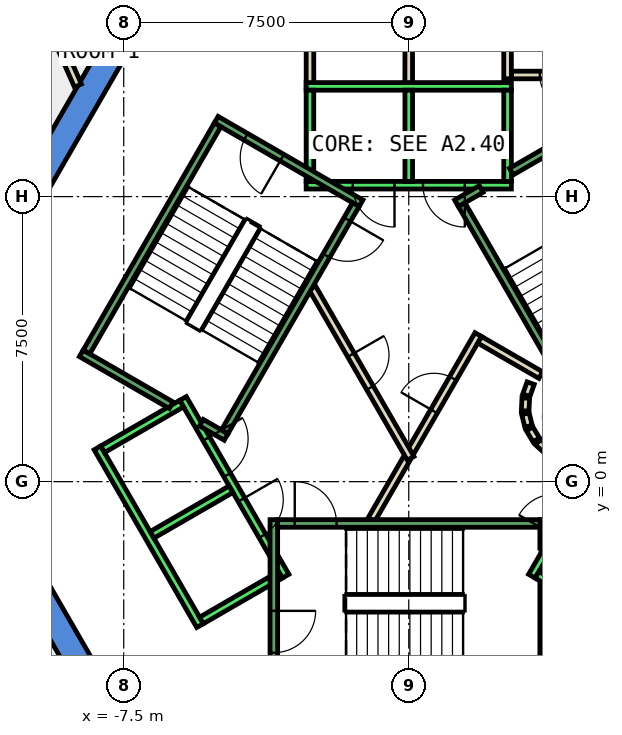
"""IFC4 building model, lengths in metres.
Left out: names, types, materials, properties, quantities, classifications, styles, units other than length and angle.
Written with IfcOpenShell. Run it as: python <this file> out.ifc"""

import sys

from ifc_helpers import new_model, si_unit, direction, frame, frame_2d, origin, place, context, subcontext, project, spatial, polyline, rectangle, outline, extrude, element, fill, save


model = new_model("IFC4")
c1 = context("Model", 3, precision=1e-05, world=origin(), true_north=direction((0.0, 1.0)))
c2 = subcontext(c1, "Body", "Model", "MODEL_VIEW")
j1 = project(units=[si_unit("LENGTHUNIT", "METRE"), si_unit("PLANEANGLEUNIT", "RADIAN")], contexts=[c1])
p1 = place(None, origin())
s1 = spatial("IfcSite", under=j1, at=p1, CompositionType="ELEMENT")
p2 = place(p1, origin())
s2 = spatial("IfcBuilding", under=s1, at=p2, CompositionType="ELEMENT")
p3 = place(p2, frame((0.0, 0.0, 198.2)))
s3 = spatial("IfcBuildingStorey", under=s2, at=p3, CompositionType="ELEMENT", Elevation=198.2)
p4 = place(p3, frame((0.0, 0.0, -0.4)))
e1 = element("IfcWall", 1, at=p4, inside=s3, PredefinedType="SHEAR", context=c2, shape_type="SweptSolid", body=[
    extrude(outline(polyline([(-11.834, 5.002), (-11.228, 4.652), (-6.235, 13.3), (-6.64, 14.0), (-11.834, 5.002)])), origin(), (0.0, 0.0, 1.0), 4.2),
])
p5 = place(p3, frame((0.0, 0.0, -0.4)))
e2 = element("IfcWall", 2, at=p5, inside=s3, PredefinedType="SHEAR", context=c2, shape_type="SweptSolid", body=[
    extrude(outline(polyline([(-13.279, 2.5), (-6.64, -9.0), (-6.235, -8.3), (-12.471, 2.5), (-13.279, 2.5)])), origin(), (0.0, 0.0, 1.0), 4.2),
])
p6 = place(p3, frame((-9.315, 11.801, 0.0), z_axis=(0.0, 0.0, 1.0), x_axis=(0.403943240321, -0.914784050254, 0.0)))
e3 = element("IfcWall", 3, at=p6, inside=s3, PredefinedType="PARTITIONING", context=c2, shape_type="SweptSolid", body=[
    extrude(rectangle(XDim=1.507, YDim=0.2, at=frame_2d((0.754, 0.0))), origin(), (0.0, 0.0, 1.0), 3.8),
])
p7 = place(p3, frame((5.1, 10.7, 0.0), z_axis=(0.0, 0.0, 1.0), x_axis=(-1.0, 0.0, 0.0)))
e4 = element("IfcWall", 4, at=p7, inside=s3, PredefinedType="PARTITIONING", context=c2, shape_type="SweptSolid", body=[
    extrude(rectangle(XDim=2.4, YDim=0.2, at=frame_2d((1.2, 0.0))), origin(), (0.0, 0.0, 1.0), 3.8),
])
p8 = place(p7, frame((0.75, 0.0, 0.0)))
e5 = element("IfcOpeningElement", 5, at=p8, cuts=e4, PredefinedType="OPENING", context=c2, shape_type="SweptSolid", body=[
    extrude(rectangle(XDim=0.9, YDim=2.1, at=frame_2d((0.45, 1.05))), frame((0.0, 0.11, 0.0), z_axis=(0.0, -1.0, 0.0), x_axis=(1.0, 0.0, 0.0)), (0.0, 0.0, 1.0), 0.22),
])
p9 = place(p3, frame((2.6, 10.6, 0.0), z_axis=(0.0, 0.0, 1.0), x_axis=(0.0, 1.0, 0.0)))
e6 = element("IfcWall", 6, at=p9, inside=s3, PredefinedType="PARTITIONING", context=c2, shape_type="SweptSolid", body=[
    extrude(rectangle(XDim=2.7, YDim=0.2, at=frame_2d((1.35, 0.0))), origin(), (0.0, 0.0, 1.0), 3.8),
])
p10 = place(p3, frame((-2.599, 10.399, 0.0), z_axis=(0.0, 0.0, 1.0), x_axis=(-0.000336615314, 0.999999943345, 0.0)))
e7 = element("IfcWall", 7, at=p10, inside=s3, PredefinedType="PARTITIONING", context=c2, shape_type="SweptSolid", body=[
    extrude(rectangle(XDim=2.901, YDim=0.2, at=frame_2d((1.451, 0.0))), origin(), (0.0, 0.0, 1.0), 3.8),
])
p11 = place(p3, frame((0.0, 13.3, 0.0), z_axis=(0.0, 0.0, 1.0), x_axis=(-0.000336728662, -0.999999943307, 0.0)))
e8 = element("IfcWall", 8, at=p11, inside=s3, PredefinedType="PARTITIONING", context=c2, shape_type="SweptSolid", body=[
    extrude(rectangle(XDim=2.9, YDim=0.2, at=frame_2d((1.45, 0.0))), origin(), (0.0, 0.0, 1.0), 3.8),
])
p12 = place(p11, frame((0.85, 0.0, 0.0)))
e9 = element("IfcOpeningElement", 9, at=p12, cuts=e8, PredefinedType="OPENING", context=c2, shape_type="SweptSolid", body=[
    extrude(rectangle(XDim=0.9, YDim=2.1, at=frame_2d((0.45, 1.05))), frame((0.0, 0.11, 0.0), z_axis=(0.0, -1.0, 0.0), x_axis=(1.0, 0.0, 0.0)), (0.0, 0.0, 1.0), 0.22),
])
p13 = place(p3, frame((-0.982, -1.0, 0.0), z_axis=(0.0, 0.0, 1.0), x_axis=(0.50024047865, 0.865886518847, 0.0)))
e10 = element("IfcWall", 10, at=p13, inside=s3, PredefinedType="PARTITIONING", context=c2, shape_type="SweptSolid", body=[
    extrude(rectangle(XDim=1.863, YDim=0.2, at=frame_2d((0.931, 0.0))), origin(), (0.0, 0.0, 1.0), 3.8),
])
p14 = place(p3, frame((0.05, 0.787, 0.0), z_axis=(0.0, 0.0, 1.0), x_axis=(0.499954076797, 0.866051915934, 0.0)))
e11 = element("IfcWall", 11, at=p14, inside=s3, PredefinedType="PARTITIONING", context=c2, shape_type="SweptSolid", body=[
    extrude(rectangle(XDim=3.558, YDim=0.2, at=frame_2d((1.779, 0.0))), origin(), (0.0, 0.0, 1.0), 3.8),
])
p15 = place(p14, frame((1.229, 0.0, 0.0)))
e12 = element("IfcOpeningElement", 12, at=p15, cuts=e11, PredefinedType="OPENING", context=c2, shape_type="SweptSolid", body=[
    extrude(rectangle(XDim=1.0, YDim=2.1, at=frame_2d((0.5, 1.05))), frame((0.0, 0.11, 0.0), z_axis=(0.0, -1.0, 0.0), x_axis=(1.0, 0.0, 0.0)), (0.0, 0.0, 1.0), 0.22),
])
p16 = place(p3, frame((1.866, 3.732, 0.0), z_axis=(0.0, 0.0, 1.0), x_axis=(0.866043361281, -0.499968895414, 0.0)))
e13 = element("IfcWall", 13, at=p16, inside=s3, PredefinedType="PARTITIONING", context=c2, shape_type="SweptSolid", body=[
    extrude(rectangle(XDim=1.858, YDim=0.2, at=frame_2d((0.929, 0.0))), origin(), (0.0, 0.0, 1.0), 3.8),
])
p17 = place(p3, frame((3.208, 2.592, 0.0), z_axis=(0.0, 0.0, 1.0), x_axis=(-0.337388820924, -0.941365382578, 0.0)))
e14 = element("IfcWall", 14, at=p17, inside=s3, PredefinedType="PARTITIONING", context=c2, shape_type="SweptSolid", body=[
    extrude(rectangle(XDim=0.338, YDim=0.2, at=frame_2d((0.169, 0.0))), origin(), (0.0, 0.0, 1.0), 3.8),
])
p18 = place(p3, frame((3.079, 2.199, 0.0), z_axis=(0.0, 0.0, 1.0), x_axis=(-0.047771483479, -0.998858290933, 0.0)))
e15 = element("IfcWall", 15, at=p18, inside=s3, PredefinedType="PARTITIONING", context=c2, shape_type="SweptSolid", body=[
    extrude(rectangle(XDim=0.337, YDim=0.2, at=frame_2d((0.169, 0.0))), origin(), (0.0, 0.0, 1.0), 3.8),
])
p19 = place(p3, frame((3.07, 1.786, 0.0), z_axis=(0.0, 0.0, 1.0), x_axis=(0.242705583207, -0.970099994784, 0.0)))
e16 = element("IfcWall", 16, at=p19, inside=s3, PredefinedType="PARTITIONING", context=c2, shape_type="SweptSolid", body=[
    extrude(rectangle(XDim=0.338, YDim=0.2, at=frame_2d((0.169, 0.0))), origin(), (0.0, 0.0, 1.0), 3.8),
])
for number, where, z_axis, x_axis in (
    (17, (3.182, 1.388, 0.0), (0.0, 0.0, 1.0), (0.512, -0.859, 0.0)),
    (18, (3.404, 1.039, 0.0), (0.0, 0.0, 1.0), (0.74, -0.672, 0.0)),
):
    element("IfcWall", number, at=place(p3, frame(where, z_axis=z_axis, x_axis=x_axis)), inside=s3, PredefinedType="PARTITIONING", context=c2, shape_type="SweptSolid", body=[
        extrude(rectangle(XDim=0.338, YDim=0.2, at=frame_2d((0.169, 0.0))), origin(), (0.0, 0.0, 1.0), 3.8),
    ])
p20 = place(p3, frame((-2.54, 5.1, 0.0), z_axis=(0.0, 0.0, 1.0), x_axis=(0.499925051871, -0.866068670783, 0.0)))
e19 = element("IfcWall", 19, at=p20, inside=s3, PredefinedType="PARTITIONING", context=c2, shape_type="SweptSolid", body=[
    extrude(rectangle(XDim=5.181, YDim=0.2, at=frame_2d((2.59, 0.0))), origin(), (0.0, 0.0, 1.0), 3.8),
])
p21 = place(p20, frame((2.04, 0.0, 0.0)))
e20 = element("IfcOpeningElement", 20, at=p21, cuts=e19, PredefinedType="OPENING", context=c2, shape_type="SweptSolid", body=[
    extrude(rectangle(XDim=1.0, YDim=2.1, at=frame_2d((0.5, 1.05))), frame((0.0, 0.11, 0.0), z_axis=(0.0, -1.0, 0.0), x_axis=(1.0, 0.0, 0.0)), (0.0, 0.0, 1.0), 0.22),
])
p22 = place(p3, frame((2.7, 7.8, 0.0), z_axis=(0.0, 0.0, 1.0), x_axis=(-1.0, 0.0, 0.0)))
e21 = element("IfcWall", 21, at=p22, inside=s3, PredefinedType="STANDARD", context=c2, shape_type="SweptSolid", body=[
    extrude(rectangle(XDim=5.4, YDim=0.2, at=frame_2d((2.7, 0.0))), origin(), (0.0, 0.0, 1.0), 3.8),
])
p23 = place(p22, frame((1.225, 0.0, 0.0)))
e22 = element("IfcOpeningElement", 22, at=p23, cuts=e21, PredefinedType="OPENING", context=c2, shape_type="SweptSolid", body=[
    extrude(rectangle(XDim=1.1, YDim=2.1, at=frame_2d((0.55, 1.05))), frame((0.0, 0.11, 0.0), z_axis=(0.0, -1.0, 0.0), x_axis=(1.0, 0.0, 0.0)), (0.0, 0.0, 1.0), 0.22),
])
p24 = place(p22, frame((3.075, 0.0, 0.0)))
e23 = element("IfcOpeningElement", 23, at=p24, cuts=e21, PredefinedType="OPENING", context=c2, shape_type="SweptSolid", body=[
    extrude(rectangle(XDim=1.1, YDim=2.1, at=frame_2d((0.55, 1.05))), frame((0.0, 0.11, 0.0), z_axis=(0.0, -1.0, 0.0), x_axis=(1.0, 0.0, 0.0)), (0.0, 0.0, 1.0), 0.22),
])
p25 = place(p3, frame((2.7, 10.4, 0.0), z_axis=(0.0, 0.0, 1.0), x_axis=(-1.0, 0.0, 0.0)))
e24 = element("IfcWall", 24, at=p25, inside=s3, PredefinedType="STANDARD", context=c2, shape_type="SweptSolid", body=[
    extrude(rectangle(XDim=5.4, YDim=0.2, at=frame_2d((2.7, 0.0))), origin(), (0.0, 0.0, 1.0), 3.8),
])
for number, where, z_axis, x_axis in (
    (25, (2.6, 7.9, 0.0), (0.0, 0.0, 1.0), (0.0, 1.0, 0.0)),
    (26, (0.0, 7.9, 0.0), (0.0, 0.0, 1.0), (0.0, 1.0, 0.0)),
    (27, (-2.6, 7.9, 0.0), (0.0, 0.0, 1.0), (0.0, 1.0, 0.0)),
):
    element("IfcWall", number, at=place(p3, frame(where, z_axis=z_axis, x_axis=x_axis)), inside=s3, PredefinedType="STANDARD", context=c2, shape_type="SweptSolid", body=[
        extrude(rectangle(XDim=2.4, YDim=0.2, at=frame_2d((1.2, 0.0))), origin(), (0.0, 0.0, 1.0), 3.8),
    ])
p26 = place(p3, frame((-5.94, 2.188, 0.0), z_axis=(0.0, 0.0, 1.0), x_axis=(0.500034260056, -0.866005622828, 0.0)))
e28 = element("IfcWall", 28, at=p26, inside=s3, PredefinedType="STANDARD", context=c2, shape_type="SweptSolid", body=[
    extrude(rectangle(XDim=5.399, YDim=0.2, at=frame_2d((2.7, 0.0))), origin(), (0.0, 0.0, 1.0), 3.8),
])
p27 = place(p26, frame((3.075, 0.0, 0.0)))
e29 = element("IfcOpeningElement", 29, at=p27, cuts=e28, PredefinedType="OPENING", context=c2, shape_type="SweptSolid", body=[
    extrude(rectangle(XDim=1.1, YDim=2.1, at=frame_2d((0.55, 1.05))), frame((0.0, 0.11, 0.0), z_axis=(0.0, -1.0, 0.0), x_axis=(1.0, 0.0, 0.0)), (0.0, 0.0, 1.0), 0.22),
])
p28 = place(p26, frame((1.225, 0.0, 0.0)))
e30 = element("IfcOpeningElement", 30, at=p28, cuts=e28, PredefinedType="OPENING", context=c2, shape_type="SweptSolid", body=[
    extrude(rectangle(XDim=1.1, YDim=2.1, at=frame_2d((0.55, 1.05))), frame((0.0, 0.11, 0.0), z_axis=(0.0, -1.0, 0.0), x_axis=(1.0, 0.0, 0.0)), (0.0, 0.0, 1.0), 0.22),
])
p29 = place(p3, frame((-8.192, 0.888, 0.0), z_axis=(0.0, 0.0, 1.0), x_axis=(0.500034260056, -0.866005622828, 0.0)))
e31 = element("IfcWall", 31, at=p29, inside=s3, PredefinedType="STANDARD", context=c2, shape_type="SweptSolid", body=[
    extrude(rectangle(XDim=5.399, YDim=0.2, at=frame_2d((2.7, 0.0))), origin(), (0.0, 0.0, 1.0), 3.8),
])
for number, where, z_axis, x_axis in (
    (32, (-5.977, 2.052, 0.0), (0.0, 0.0, 1.0), (-0.866, -0.5, 0.0)),
    (33, (-4.677, -0.2, 0.0), (0.0, 0.0, 1.0), (-0.866, -0.5, 0.0)),
):
    element("IfcWall", number, at=place(p3, frame(where, z_axis=z_axis, x_axis=x_axis)), inside=s3, PredefinedType="STANDARD", context=c2, shape_type="SweptSolid", body=[
        extrude(rectangle(XDim=2.399, YDim=0.2, at=frame_2d((1.2, 0.0))), origin(), (0.0, 0.0, 1.0), 3.8),
    ])
p30 = place(p3, frame((-3.377, -2.452, 0.0), z_axis=(0.0, 0.0, 1.0), x_axis=(-0.865955154139, -0.50012165622, 0.0)))
e34 = element("IfcWall", 34, at=p30, inside=s3, PredefinedType="STANDARD", context=c2, shape_type="SweptSolid", body=[
    extrude(rectangle(XDim=2.4, YDim=0.2, at=frame_2d((1.2, 0.0))), origin(), (0.0, 0.0, 1.0), 3.8),
])
p31 = place(p3, frame((3.24, -2.488, 0.0), z_axis=(0.0, 0.0, 1.0), x_axis=(0.500034260056, 0.866005622828, 0.0)))
e35 = element("IfcWall", 35, at=p31, inside=s3, PredefinedType="STANDARD", context=c2, shape_type="SweptSolid", body=[
    extrude(rectangle(XDim=5.399, YDim=0.2, at=frame_2d((2.7, 0.0))), origin(), (0.0, 0.0, 1.0), 3.8),
])
p32 = place(p31, frame((3.225, 0.0, 0.0)))
e36 = element("IfcOpeningElement", 36, at=p32, cuts=e35, PredefinedType="OPENING", context=c2, shape_type="SweptSolid", body=[
    extrude(rectangle(XDim=1.1, YDim=2.1, at=frame_2d((0.55, 1.05))), frame((0.0, 0.11, 0.0), z_axis=(0.0, -1.0, 0.0), x_axis=(1.0, 0.0, 0.0)), (0.0, 0.0, 1.0), 0.22),
])
p33 = place(p31, frame((1.225, 0.0, 0.0)))
e37 = element("IfcOpeningElement", 37, at=p33, cuts=e35, PredefinedType="OPENING", context=c2, shape_type="SweptSolid", body=[
    extrude(rectangle(XDim=1.1, YDim=2.1, at=frame_2d((0.55, 1.05))), frame((0.0, 0.11, 0.0), z_axis=(0.0, -1.0, 0.0), x_axis=(1.0, 0.0, 0.0)), (0.0, 0.0, 1.0), 0.22),
])
p34 = place(p3, frame((3.377, -2.452, 0.0), z_axis=(0.0, 0.0, 1.0), x_axis=(0.865955154139, -0.50012165622, 0.0)))
e38 = element("IfcWall", 38, at=p34, inside=s3, PredefinedType="STANDARD", context=c2, shape_type="SweptSolid", body=[
    extrude(rectangle(XDim=2.4, YDim=0.2, at=frame_2d((1.2, 0.0))), origin(), (0.0, 0.0, 1.0), 3.8),
])
p35 = place(p3, frame((-3.55, -1.0, 0.0), z_axis=(0.0, 0.0, 1.0), x_axis=(0.0, -1.0, 0.0)))
e39 = element("IfcWall", 39, at=p35, inside=s3, PredefinedType="STANDARD", context=c2, shape_type="SweptSolid", body=[
    extrude(rectangle(XDim=4.4, YDim=0.2, at=frame_2d((2.2, 0.0))), origin(), (0.0, 0.0, 1.0), 3.8),
])
p36 = place(p35, frame((2.4, 0.0, 0.0)))
e40 = element("IfcOpeningElement", 40, at=p36, cuts=e39, PredefinedType="OPENING", context=c2, shape_type="SweptSolid", body=[
    extrude(rectangle(XDim=1.1, YDim=2.2, at=frame_2d((0.55, 1.1))), frame((0.0, 0.11, 0.0), z_axis=(0.0, -1.0, 0.0), x_axis=(1.0, 0.0, 0.0)), (0.0, 0.0, 1.0), 0.22),
])
p37 = place(p3, frame((3.55, -2.667, 0.0), z_axis=(0.0, 0.0, 1.0), x_axis=(0.0, -1.0, 0.0)))
e41 = element("IfcWall", 41, at=p37, inside=s3, PredefinedType="STANDARD", context=c2, shape_type="SweptSolid", body=[
    extrude(rectangle(XDim=2.733, YDim=0.2, at=frame_2d((1.366, 0.0))), origin(), (0.0, 0.0, 1.0), 3.8),
])
p38 = place(p3, frame((3.55, -1.0, 0.0), z_axis=(0.0, 0.0, 1.0), x_axis=(0.0, -1.0, 0.0)))
e42 = element("IfcWall", 42, at=p38, inside=s3, PredefinedType="STANDARD", context=c2, shape_type="SweptSolid", body=[
    extrude(rectangle(XDim=0.751, YDim=0.2, at=frame_2d((0.375, 0.0))), origin(), (0.0, 0.0, 1.0), 3.8),
])
p39 = place(p3, frame((-3.45, -1.1, 0.0), z_axis=(0.0, 0.0, 1.0), x_axis=(1.0, 0.0, 0.0)))
e43 = element("IfcWall", 43, at=p39, inside=s3, PredefinedType="STANDARD", context=c2, shape_type="SweptSolid", body=[
    extrude(rectangle(XDim=6.9, YDim=0.2, at=frame_2d((3.45, 0.0))), origin(), (0.0, 0.0, 1.0), 3.8),
])
p40 = place(p39, frame((0.45, 0.0, 0.0)))
e44 = element("IfcOpeningElement", 44, at=p40, cuts=e43, PredefinedType="OPENING", context=c2, shape_type="SweptSolid", body=[
    extrude(rectangle(XDim=1.1, YDim=2.2, at=frame_2d((0.55, 1.1))), frame((0.0, 0.11, 0.0), z_axis=(0.0, -1.0, 0.0), x_axis=(1.0, 0.0, 0.0)), (0.0, 0.0, 1.0), 0.22),
])
p41 = place(p3, frame((2.7, 8.158, 0.0), z_axis=(0.0, 0.0, 1.0), x_axis=(0.86611865017, 0.499838457731, 0.0)))
e45 = element("IfcWall", 45, at=p41, inside=s3, PredefinedType="STANDARD", context=c2, shape_type="SweptSolid", body=[
    extrude(rectangle(XDim=2.733, YDim=0.2, at=frame_2d((1.366, 0.0))), origin(), (0.0, 0.0, 1.0), 3.8),
])
p42 = place(p3, frame((1.256, 7.324, 0.0), z_axis=(0.0, 0.0, 1.0), x_axis=(0.865915093549, 0.500191014278, 0.0)))
e46 = element("IfcWall", 46, at=p42, inside=s3, PredefinedType="STANDARD", context=c2, shape_type="SweptSolid", body=[
    extrude(rectangle(XDim=0.752, YDim=0.2, at=frame_2d((0.376, 0.0))), origin(), (0.0, 0.0, 1.0), 3.8),
])
p43 = place(p3, frame((4.843, 1.312, 0.0), z_axis=(0.0, 0.0, 1.0), x_axis=(-0.499963383562, 0.866046543262, 0.0)))
e47 = element("IfcWall", 47, at=p43, inside=s3, PredefinedType="STANDARD", context=c2, shape_type="SweptSolid", body=[
    extrude(rectangle(XDim=6.9, YDim=0.2, at=frame_2d((3.45, 0.0))), origin(), (0.0, 0.0, 1.0), 3.8),
])
p44 = place(p43, frame((0.45, 0.0, 0.0)))
e48 = element("IfcOpeningElement", 48, at=p44, cuts=e47, PredefinedType="OPENING", context=c2, shape_type="SweptSolid", body=[
    extrude(rectangle(XDim=1.1, YDim=2.2, at=frame_2d((0.55, 1.1))), frame((0.0, 0.11, 0.0), z_axis=(0.0, -1.0, 0.0), x_axis=(1.0, 0.0, 0.0)), (0.0, 0.0, 1.0), 0.22),
])
p45 = place(p3, frame((-1.256, 7.324, 0.0), z_axis=(0.0, 0.0, 1.0), x_axis=(-0.866046073146, 0.499964197906, 0.0)))
e49 = element("IfcWall", 49, at=p45, inside=s3, PredefinedType="STANDARD", context=c2, shape_type="SweptSolid", body=[
    extrude(rectangle(XDim=4.4, YDim=0.2, at=frame_2d((2.2, 0.0))), origin(), (0.0, 0.0, 1.0), 3.8),
])
p46 = place(p45, frame((2.4, 0.0, 0.0)))
e50 = element("IfcOpeningElement", 50, at=p46, cuts=e49, PredefinedType="OPENING", context=c2, shape_type="SweptSolid", body=[
    extrude(rectangle(XDim=1.1, YDim=2.2, at=frame_2d((0.55, 1.1))), frame((0.0, 0.11, 0.0), z_axis=(0.0, -1.0, 0.0), x_axis=(1.0, 0.0, 0.0)), (0.0, 0.0, 1.0), 0.22),
])
p47 = place(p3, frame((-6.25, 2.01, 0.0), z_axis=(0.0, 0.0, 1.0), x_axis=(-0.86611865017, 0.499838457731, 0.0)))
e51 = element("IfcWall", 51, at=p47, inside=s3, PredefinedType="STANDARD", context=c2, shape_type="SweptSolid", body=[
    extrude(rectangle(XDim=2.733, YDim=0.2, at=frame_2d((1.366, 0.0))), origin(), (0.0, 0.0, 1.0), 3.8),
])
p48 = place(p3, frame((-4.806, 1.176, 0.0), z_axis=(0.0, 0.0, 1.0), x_axis=(-0.866558586415, 0.499075361355, 0.0)))
e52 = element("IfcWall", 52, at=p48, inside=s3, PredefinedType="STANDARD", context=c2, shape_type="SweptSolid", body=[
    extrude(rectangle(XDim=0.751, YDim=0.2, at=frame_2d((0.376, 0.0))), origin(), (0.0, 0.0, 1.0), 3.8),
])
p49 = place(p3, frame((-1.393, 7.288, 0.0), z_axis=(0.0, 0.0, 1.0), x_axis=(-0.499963383562, -0.866046543262, 0.0)))
e53 = element("IfcWall", 53, at=p49, inside=s3, PredefinedType="STANDARD", context=c2, shape_type="SweptSolid", body=[
    extrude(rectangle(XDim=6.9, YDim=0.2, at=frame_2d((3.45, 0.0))), origin(), (0.0, 0.0, 1.0), 3.8),
])
p50 = place(p49, frame((0.45, 0.0, 0.0)))
e54 = element("IfcOpeningElement", 54, at=p50, cuts=e53, PredefinedType="OPENING", context=c2, shape_type="SweptSolid", body=[
    extrude(rectangle(XDim=1.1, YDim=2.2, at=frame_2d((0.55, 1.1))), frame((0.0, 0.11, 0.0), z_axis=(0.0, -1.0, 0.0), x_axis=(1.0, 0.0, 0.0)), (0.0, 0.0, 1.0), 0.22),
])
p51 = place(p3, frame((-5.03, 9.388, 0.0), z_axis=(0.0, 0.0, 1.0), x_axis=(-0.499978703459, -0.866037698999, 0.0)))
e55 = element("IfcWall", 55, at=p51, inside=s3, PredefinedType="STANDARD", context=c2, shape_type="SweptSolid", body=[
    extrude(rectangle(XDim=6.9, YDim=0.2, at=frame_2d((3.45, 0.0))), origin(), (0.0, 0.0, 1.0), 3.8),
])
p52 = place(p15, origin())
e56 = element("IfcDoor", 56, at=p52, inside=s3, OperationType="SINGLE_SWING_RIGHT", PredefinedType="DOOR", context=c2, shape_type="SweptSolid", body=[
    extrude(rectangle(XDim=1.0, YDim=2.1, at=frame_2d((0.5, 1.05))), frame((0.0, 0.025, 0.0), z_axis=(0.0, -1.0, 0.0), x_axis=(1.0, 0.0, 0.0)), (0.0, 0.0, 1.0), 0.05),
])
fill(e12, e56)
p53 = place(p21, origin())
e57 = element("IfcDoor", 57, at=p53, inside=s3, OperationType="SINGLE_SWING_RIGHT", PredefinedType="DOOR", context=c2, shape_type="SweptSolid", body=[
    extrude(rectangle(XDim=1.0, YDim=2.1, at=frame_2d((0.5, 1.05))), frame((0.0, 0.025, 0.0), z_axis=(0.0, -1.0, 0.0), x_axis=(1.0, 0.0, 0.0)), (0.0, 0.0, 1.0), 0.05),
])
fill(e20, e57)
p54 = place(p8, origin())
e58 = element("IfcDoor", 58, at=p54, inside=s3, OperationType="SINGLE_SWING_RIGHT", PredefinedType="DOOR", context=c2, shape_type="SweptSolid", body=[
    extrude(rectangle(XDim=0.9, YDim=2.1, at=frame_2d((0.45, 1.05))), frame((0.0, 0.025, 0.0), z_axis=(0.0, -1.0, 0.0), x_axis=(1.0, 0.0, 0.0)), (0.0, 0.0, 1.0), 0.05),
])
fill(e5, e58)
p55 = place(p23, origin())
e59 = element("IfcDoor", 59, at=p55, inside=s3, OperationType="SLIDING_TO_LEFT", PredefinedType="DOOR", context=c2, shape_type="SweptSolid", body=[
    extrude(rectangle(XDim=1.1, YDim=2.1, at=frame_2d((0.55, 1.05))), frame((0.0, 0.025, 0.0), z_axis=(0.0, -1.0, 0.0), x_axis=(1.0, 0.0, 0.0)), (0.0, 0.0, 1.0), 0.05),
])
fill(e22, e59)
p56 = place(p24, origin())
e60 = element("IfcDoor", 60, at=p56, inside=s3, OperationType="SLIDING_TO_LEFT", PredefinedType="DOOR", context=c2, shape_type="SweptSolid", body=[
    extrude(rectangle(XDim=1.1, YDim=2.1, at=frame_2d((0.55, 1.05))), frame((0.0, 0.025, 0.0), z_axis=(0.0, -1.0, 0.0), x_axis=(1.0, 0.0, 0.0)), (0.0, 0.0, 1.0), 0.05),
])
fill(e23, e60)
p57 = place(p27, origin())
e61 = element("IfcDoor", 61, at=p57, inside=s3, OperationType="SLIDING_TO_LEFT", PredefinedType="DOOR", context=c2, shape_type="SweptSolid", body=[
    extrude(rectangle(XDim=1.1, YDim=2.1, at=frame_2d((0.55, 1.05))), frame((0.0, 0.025, 0.0), z_axis=(0.0, -1.0, 0.0), x_axis=(1.0, 0.0, 0.0)), (0.0, 0.0, 1.0), 0.05),
])
fill(e29, e61)
p58 = place(p28, origin())
e62 = element("IfcDoor", 62, at=p58, inside=s3, OperationType="SLIDING_TO_LEFT", PredefinedType="DOOR", context=c2, shape_type="SweptSolid", body=[
    extrude(rectangle(XDim=1.1, YDim=2.1, at=frame_2d((0.55, 1.05))), frame((0.0, 0.025, 0.0), z_axis=(0.0, -1.0, 0.0), x_axis=(1.0, 0.0, 0.0)), (0.0, 0.0, 1.0), 0.05),
])
fill(e30, e62)
p59 = place(p40, origin())
e63 = element("IfcDoor", 63, at=p59, inside=s3, OperationType="SINGLE_SWING_LEFT", PredefinedType="DOOR", context=c2, shape_type="SweptSolid", body=[
    extrude(rectangle(XDim=1.1, YDim=2.2, at=frame_2d((0.55, 1.1))), frame((0.0, 0.025, 0.0), z_axis=(0.0, -1.0, 0.0), x_axis=(1.0, 0.0, 0.0)), (0.0, 0.0, 1.0), 0.05),
])
fill(e44, e63)
p60 = place(p36, origin())
e64 = element("IfcDoor", 64, at=p60, inside=s3, OperationType="SINGLE_SWING_LEFT", PredefinedType="DOOR", context=c2, shape_type="SweptSolid", body=[
    extrude(rectangle(XDim=1.1, YDim=2.2, at=frame_2d((0.55, 1.1))), frame((0.0, 0.025, 0.0), z_axis=(0.0, -1.0, 0.0), x_axis=(1.0, 0.0, 0.0)), (0.0, 0.0, 1.0), 0.05),
])
fill(e40, e64)
p61 = place(p50, origin())
e65 = element("IfcDoor", 65, at=p61, inside=s3, OperationType="SINGLE_SWING_LEFT", PredefinedType="DOOR", context=c2, shape_type="SweptSolid", body=[
    extrude(rectangle(XDim=1.1, YDim=2.2, at=frame_2d((0.55, 1.1))), frame((0.0, 0.025, 0.0), z_axis=(0.0, -1.0, 0.0), x_axis=(1.0, 0.0, 0.0)), (0.0, 0.0, 1.0), 0.05),
])
fill(e54, e65)
p62 = place(p46, origin())
e66 = element("IfcDoor", 66, at=p62, inside=s3, OperationType="SINGLE_SWING_LEFT", PredefinedType="DOOR", context=c2, shape_type="SweptSolid", body=[
    extrude(rectangle(XDim=1.1, YDim=2.2, at=frame_2d((0.55, 1.1))), frame((0.0, 0.025, 0.0), z_axis=(0.0, -1.0, 0.0), x_axis=(1.0, 0.0, 0.0)), (0.0, 0.0, 1.0), 0.05),
])
fill(e50, e66)
save(model, sys.argv[1])
